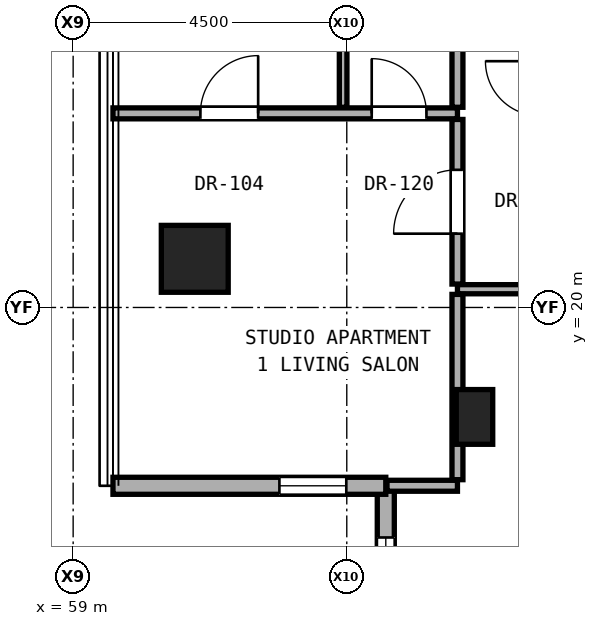
"""IFC4 building model, lengths in metres.
Left out: names, types, materials, properties, quantities, classifications, styles, units other than length and angle.
Written with IfcOpenShell. Run it as: python <this file> out.ifc"""

import sys

from ifc_helpers import new_model, si_unit, direction, frame, frame_2d, origin, origin_2d, place, context, subcontext, project, spatial, rectangle, hollow_rectangle, extrude, element, fill, save


model = new_model("IFC4")
c1 = context("Model", 3, precision=1e-05, world=origin(), true_north=direction((0.0, 1.0)))
c2 = subcontext(c1, "Body", "Model", "MODEL_VIEW")
j1 = project(units=[si_unit("LENGTHUNIT", "METRE"), si_unit("PLANEANGLEUNIT", "RADIAN")], contexts=[c1])
p1 = place(None, origin())
s1 = spatial("IfcSite", under=j1, at=p1, CompositionType="ELEMENT")
p2 = place(p1, origin())
s2 = spatial("IfcBuilding", under=s1, at=p2, CompositionType="ELEMENT")
p3 = place(p2, frame((0.0, 0.0, 118.1)))
s3 = spatial("IfcBuildingStorey", under=s2, at=p3, CompositionType="ELEMENT", Elevation=118.1)
p4 = place(p3, frame((61.0, 20.8, 0.0), z_axis=(0.0, 0.0, 1.0), x_axis=(1.0, 0.0, 0.0)))
e1 = element("IfcColumn", 1, at=p4, inside=s3, PredefinedType="COLUMN", context=c2, shape_type="SweptSolid", body=[
    extrude(hollow_rectangle(XDim=1.1, YDim=1.1, WallThickness=0.06, at=origin_2d()), origin(), (0.0, 0.0, 1.0), 3.3),
])
p5 = place(p3, frame((65.6, 18.2, 0.0), z_axis=(0.0, 0.0, 1.0), x_axis=(1.0, 0.0, 0.0)))
e2 = element("IfcColumn", 2, at=p5, inside=s3, PredefinedType="PILASTER", context=c2, shape_type="SweptSolid", body=[
    extrude(rectangle(XDim=0.6, YDim=0.9, at=origin_2d()), origin(), (0.0, 0.0, 1.0), 3.3),
])
p6 = place(p3, frame((64.142, 17.067, 0.0), z_axis=(0.0, 0.0, 1.0), x_axis=(0.0, -1.0, 0.0)))
e3 = element("IfcWall", 3, at=p6, inside=s3, PredefinedType="SOLIDWALL", context=c2, shape_type="SweptSolid", body=[
    extrude(rectangle(XDim=4.486, YDim=0.28, at=frame_2d((2.243, 0.0))), origin(), (0.0, 0.0, 1.0), 3.06),
])
p7 = place(p6, frame((0.85, 0.0, 0.81)))
e4 = element("IfcOpeningElement", 4, at=p7, cuts=e3, PredefinedType="OPENING", context=c2, shape_type="SweptSolid", body=[
    extrude(rectangle(XDim=1.8, YDim=2.1, at=frame_2d((0.9, 1.05))), frame((0.0, 0.15, 0.0), z_axis=(0.0, -1.0, 0.0), x_axis=(1.0, 0.0, 0.0)), (0.0, 0.0, 1.0), 0.3),
])
p8 = place(p3, frame((59.655, 17.067, 0.0), z_axis=(0.0, 0.0, 1.0), x_axis=(1.0, 0.0, 0.0)))
e5 = element("IfcWall", 5, at=p8, inside=s3, PredefinedType="SOLIDWALL", context=c2, shape_type="SweptSolid", body=[
    extrude(rectangle(XDim=4.487, YDim=0.28, at=frame_2d((2.243, 0.0))), origin(), (0.0, 0.0, 1.0), 3.06),
])
p9 = place(p8, frame((2.737, 0.0, 0.85)))
e6 = element("IfcOpeningElement", 6, at=p9, cuts=e5, PredefinedType="OPENING", context=c2, shape_type="SweptSolid", body=[
    extrude(rectangle(XDim=1.1, YDim=2.0, at=frame_2d((0.55, 1.0))), frame((0.0, 0.15, 0.0), z_axis=(0.0, -1.0, 0.0), x_axis=(1.0, 0.0, 0.0)), (0.0, 0.0, 1.0), 0.3),
])
p10 = place(p3, frame((64.162, 17.068, 0.0), z_axis=(0.0, 0.0, 1.0), x_axis=(1.0, 0.0, 0.0)))
e7 = element("IfcWall", 7, at=p10, inside=s3, PredefinedType="PARTITIONING", context=c2, shape_type="SweptSolid", body=[
    extrude(rectangle(XDim=1.158, YDim=0.18, at=frame_2d((0.579, 0.0))), origin(), (0.0, 0.0, 1.0), 3.08),
])
p11 = place(p3, frame((65.32, 20.3, 0.0), z_axis=(0.0, 0.0, 1.0), x_axis=(1.0, 0.0, 0.0)))
e8 = element("IfcWall", 8, at=p11, inside=s3, PredefinedType="PARTITIONING", context=c2, shape_type="SweptSolid", body=[
    extrude(rectangle(XDim=1.36, YDim=0.15, at=frame_2d((0.68, 0.0))), origin(), (0.0, 0.0, 1.0), 3.08),
])
p12 = place(p3, frame((59.655, 23.192, 0.0), z_axis=(0.0, 0.0, 1.0), x_axis=(1.0, 0.0, 0.0)))
e9 = element("IfcWall", 9, at=p12, inside=s3, PredefinedType="PARTITIONING", context=c2, shape_type="SweptSolid", body=[
    extrude(rectangle(XDim=5.665, YDim=0.18, at=frame_2d((2.833, 0.0))), origin(), (0.0, 0.0, 1.0), 2.299),
])
p13 = place(p12, frame((1.438, 0.0, 0.0)))
e10 = element("IfcOpeningElement", 10, at=p13, cuts=e9, PredefinedType="OPENING", context=c2, shape_type="SweptSolid", body=[
    extrude(rectangle(XDim=0.95, YDim=2.15, at=frame_2d((0.475, 1.075))), frame((0.0, 0.1, 0.0), z_axis=(0.0, -1.0, 0.0), x_axis=(1.0, 0.0, 0.0)), (0.0, 0.0, 1.0), 0.2),
])
p14 = place(p12, frame((4.255, 0.0, 0.0)))
e11 = element("IfcOpeningElement", 11, at=p14, cuts=e9, PredefinedType="OPENING", context=c2, shape_type="SweptSolid", body=[
    extrude(rectangle(XDim=0.9, YDim=2.1, at=frame_2d((0.45, 1.05))), frame((0.0, 0.1, 0.0), z_axis=(0.0, -1.0, 0.0), x_axis=(1.0, 0.0, 0.0)), (0.0, 0.0, 1.0), 0.2),
])
p15 = place(p3, frame((63.44, 23.292, 0.0), z_axis=(0.0, 0.0, 1.0), x_axis=(0.0, 1.0, 0.0)))
e12 = element("IfcWall", 12, at=p15, inside=s3, PredefinedType="PARTITIONING", context=c2, shape_type="SweptSolid", body=[
    extrude(rectangle(XDim=2.127, YDim=0.125, at=frame_2d((1.064, 0.0))), origin(), (0.0, 0.0, 1.0), 3.08),
])
p16 = place(p3, frame((65.32, 17.168, 0.0), z_axis=(0.0, 0.0, 1.0), x_axis=(0.0, 1.0, 0.0)))
e13 = element("IfcWall", 13, at=p16, inside=s3, PredefinedType="PARTITIONING", context=c2, shape_type="SweptSolid", body=[
    extrude(rectangle(XDim=3.047, YDim=0.18, at=frame_2d((1.523, 0.0))), origin(), (0.0, 0.0, 1.0), 2.523),
])
p17 = place(p3, frame((65.32, 20.385, 0.0), z_axis=(0.0, 0.0, 1.0), x_axis=(0.0, 1.0, 0.0)))
e14 = element("IfcWall", 14, at=p17, inside=s3, PredefinedType="PARTITIONING", context=c2, shape_type="SweptSolid", body=[
    extrude(rectangle(XDim=2.707, YDim=0.18, at=frame_2d((1.354, 0.0))), origin(), (0.0, 0.0, 1.0), 2.472),
])
p18 = place(p17, frame((0.829, 0.0, 0.0)))
e15 = element("IfcOpeningElement", 15, at=p18, cuts=e14, PredefinedType="OPENING", context=c2, shape_type="SweptSolid", body=[
    extrude(rectangle(XDim=1.05, YDim=2.2, at=frame_2d((0.525, 1.1))), frame((0.0, 0.1, 0.0), z_axis=(0.0, -1.0, 0.0), x_axis=(1.0, 0.0, 0.0)), (0.0, 0.0, 1.0), 0.2),
])
p19 = place(p3, frame((65.32, 23.292, 0.0), z_axis=(0.0, 0.0, 1.0), x_axis=(0.0, 1.0, 0.0)))
e16 = element("IfcWall", 16, at=p19, inside=s3, PredefinedType="PARTITIONING", context=c2, shape_type="SweptSolid", body=[
    extrude(rectangle(XDim=2.127, YDim=0.18, at=frame_2d((1.064, 0.0))), origin(), (0.0, 0.0, 1.0), 3.08),
])
p20 = place(p7, origin())
e17 = element("IfcWindow", 17, at=p20, inside=s3, PartitioningType="SINGLE_PANEL", PredefinedType="WINDOW", context=c2, shape_type="SweptSolid", body=[
    extrude(rectangle(XDim=1.8, YDim=2.1, at=frame_2d((0.9, 1.05))), frame((0.0, 0.03, 0.0), z_axis=(0.0, -1.0, 0.0), x_axis=(1.0, 0.0, 0.0)), (0.0, 0.0, 1.0), 0.06),
])
fill(e4, e17)
p21 = place(p9, origin())
e18 = element("IfcWindow", 18, at=p21, inside=s3, PartitioningType="SINGLE_PANEL", PredefinedType="WINDOW", context=c2, shape_type="SweptSolid", body=[
    extrude(rectangle(XDim=1.1, YDim=2.0, at=frame_2d((0.55, 1.0))), frame((0.0, 0.03, 0.0), z_axis=(0.0, -1.0, 0.0), x_axis=(1.0, 0.0, 0.0)), (0.0, 0.0, 1.0), 0.06),
])
fill(e6, e18)
p22 = place(p18, origin())
e19 = element("IfcDoor", 19, at=p22, inside=s3, OperationType="SINGLE_SWING_LEFT", PredefinedType="DOOR", context=c2, shape_type="SweptSolid", body=[
    extrude(rectangle(XDim=1.05, YDim=2.2, at=frame_2d((0.525, 1.1))), frame((0.0, 0.025, 0.0), z_axis=(0.0, -1.0, 0.0), x_axis=(1.0, 0.0, 0.0)), (0.0, 0.0, 1.0), 0.05),
])
fill(e15, e19)
p23 = place(p13, origin())
e20 = element("IfcDoor", 20, at=p23, inside=s3, OperationType="SINGLE_SWING_RIGHT", PredefinedType="DOOR", context=c2, shape_type="SweptSolid", body=[
    extrude(rectangle(XDim=0.95, YDim=2.15, at=frame_2d((0.475, 1.075))), frame((0.0, 0.025, 0.0), z_axis=(0.0, -1.0, 0.0), x_axis=(1.0, 0.0, 0.0)), (0.0, 0.0, 1.0), 0.05),
])
fill(e10, e20)
p24 = place(p14, origin())
e21 = element("IfcDoor", 21, at=p24, inside=s3, OperationType="SINGLE_SWING_LEFT", PredefinedType="DOOR", context=c2, shape_type="SweptSolid", body=[
    extrude(rectangle(XDim=0.9, YDim=2.1, at=frame_2d((0.45, 1.05))), frame((0.0, 0.025, 0.0), z_axis=(0.0, -1.0, 0.0), x_axis=(1.0, 0.0, 0.0)), (0.0, 0.0, 1.0), 0.05),
])
fill(e11, e21)
save(model, sys.argv[1])
